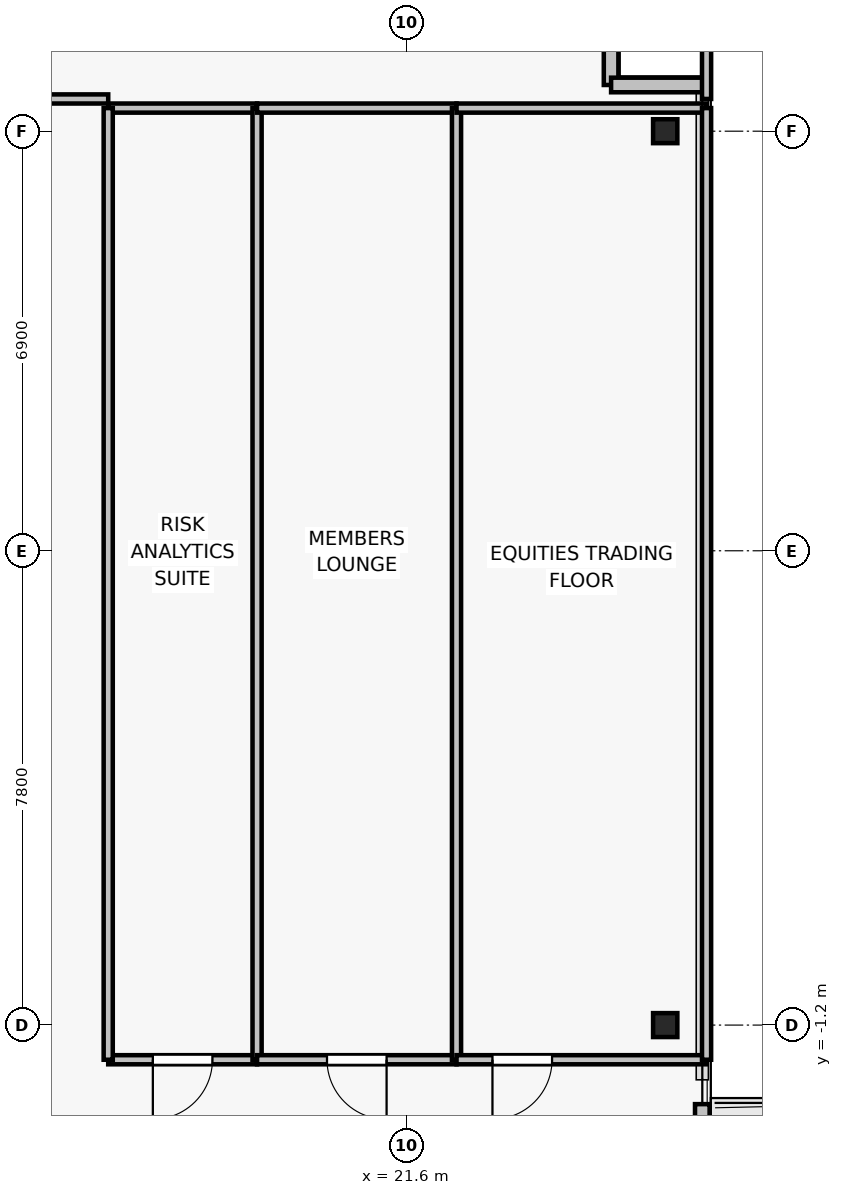
"""IFC4 building model, lengths in metres.
Left out: names, types, materials, properties, quantities, classifications, styles, units other than length and angle.
Written with IfcOpenShell. Run it as: python <this file> out.ifc"""

import sys

from ifc_helpers import new_model, si_unit, direction, frame, frame_2d, origin, origin_2d, place, context, subcontext, project, spatial, rectangle, i_section, extrude, source, transform, mapped, element, fill, save


model = new_model("IFC4")
c1 = context("Model", 3, precision=1e-05, world=origin(), true_north=direction((0.0, 1.0)))
c2 = subcontext(c1, "Body", "Model", "MODEL_VIEW")
j1 = project(units=[si_unit("LENGTHUNIT", "METRE"), si_unit("PLANEANGLEUNIT", "RADIAN")], contexts=[c1])
p1 = place(None, origin())
s1 = spatial("IfcSite", under=j1, at=p1, CompositionType="ELEMENT")
p2 = place(p1, origin())
s2 = spatial("IfcBuilding", under=s1, at=p2, CompositionType="ELEMENT")
p3 = place(p2, frame((0.0, 0.0, 182.5)))
s3 = spatial("IfcBuildingStorey", under=s2, at=p3, CompositionType="ELEMENT", Elevation=182.5)
for number, where, z_axis, x_axis in (
    (1, (25.85, -1.2, 0.0), (0.0, 0.0, 1.0), (1.0, 0.0, 0.0)),
    (2, (25.85, 13.5, 0.0), (0.0, 0.0, 1.0), (1.0, 0.0, 0.0)),
):
    element("IfcColumn", number, at=place(p3, frame(where, z_axis=z_axis, x_axis=x_axis)), inside=s3, PredefinedType="COLUMN", context=c2, shape_type="SweptSolid", body=[
        extrude(i_section(OverallWidth=0.399, OverallDepth=0.394, WebThickness=0.023, FlangeThickness=0.037, FilletRadius=0.015, at=origin_2d()), origin(), (0.0, 0.0, 1.0), 3.3),
    ])
p4 = place(p3, frame((26.46, -2.5, 0.0), z_axis=(0.0, 0.0, 1.0), x_axis=(0.0, -1.0, 0.0)))
e3 = element("IfcWall", 3, at=p4, inside=s3, PredefinedType="SOLIDWALL", context=c2, shape_type="SweptSolid", body=[
    extrude(rectangle(XDim=5.8, YDim=0.24, at=frame_2d((2.9, 0.0))), origin(), (0.0, 0.0, 1.0), 3.075),
])
p5 = place(p4, frame((1.566, 0.0, 0.0)))
e4 = element("IfcOpeningElement", 4, at=p5, cuts=e3, PredefinedType="OPENING", context=c2, shape_type="SweptSolid", body=[
    extrude(rectangle(XDim=1.0, YDim=2.2, at=frame_2d((0.5, 1.1))), frame((0.0, 0.13, 0.0), z_axis=(0.0, -1.0, 0.0), x_axis=(1.0, 0.0, 0.0)), (0.0, 0.0, 1.0), 0.26),
])
p6 = place(p4, frame((2.85, 0.0, 0.85)))
e5 = element("IfcOpeningElement", 5, at=p6, cuts=e3, PredefinedType="OPENING", context=c2, shape_type="SweptSolid", body=[
    extrude(rectangle(XDim=1.5, YDim=1.6, at=frame_2d((0.75, 0.8))), frame((0.0, 0.13, 0.0), z_axis=(0.0, -1.0, 0.0), x_axis=(1.0, 0.0, 0.0)), (0.0, 0.0, 1.0), 0.26),
])
for number, where, z_axis, x_axis in (
    (6, (24.96, 14.26, 0.0), (0.0, 0.0, 1.0), (0.0, 1.0, 0.0)),
    (7, (26.46, 14.26, 0.0), (0.0, 0.0, 1.0), (-1.0, 0.0, 0.0)),
):
    element("IfcWall", number, at=place(p3, frame(where, z_axis=z_axis, x_axis=x_axis)), inside=s3, PredefinedType="SOLIDWALL", context=c2, shape_type="SweptSolid", body=[
        extrude(rectangle(XDim=1.5, YDim=0.24, at=frame_2d((0.75, 0.0))), origin(), (0.0, 0.0, 1.0), 3.075),
    ])
p7 = place(p3, frame((19.138, -1.77, 0.0), z_axis=(0.0, 0.0, 1.0), x_axis=(-1.0, 0.0, 0.0)))
e8 = element("IfcWall", 8, at=p7, inside=s3, PredefinedType="PARTITIONING", context=c2, shape_type="SweptSolid", body=[
    extrude(rectangle(XDim=2.448, YDim=0.15, at=frame_2d((1.224, 0.0))), origin(), (0.0, 0.0, 1.0), 3.075),
])
p8 = place(p7, frame((0.734, 0.0, 0.0)))
e9 = element("IfcOpeningElement", 9, at=p8, cuts=e8, PredefinedType="OPENING", context=c2, shape_type="SweptSolid", body=[
    extrude(rectangle(XDim=0.98, YDim=2.15, at=frame_2d((0.49, 1.075))), frame((0.0, 0.085, 0.0), z_axis=(0.0, -1.0, 0.0), x_axis=(1.0, 0.0, 0.0)), (0.0, 0.0, 1.0), 0.17),
])
p9 = place(p3, frame((16.69, 13.88, 0.0), z_axis=(0.0, 0.0, 1.0), x_axis=(1.0, 0.0, 0.0)))
e10 = element("IfcWall", 10, at=p9, inside=s3, PredefinedType="PARTITIONING", context=c2, shape_type="SweptSolid", body=[
    extrude(rectangle(XDim=2.448, YDim=0.15, at=frame_2d((1.224, 0.0))), origin(), (0.0, 0.0, 1.0), 3.075),
])
for number, where, z_axis, x_axis in (
    (11, (16.69, -1.77, 0.0), (0.0, 0.0, 1.0), (0.0, 1.0, 0.0)),
    (12, (19.138, 13.88, 0.0), (0.0, 0.0, 1.0), (0.0, -1.0, 0.0)),
):
    element("IfcWall", number, at=place(p3, frame(where, z_axis=z_axis, x_axis=x_axis)), inside=s3, PredefinedType="PARTITIONING", context=c2, shape_type="SweptSolid", body=[
        extrude(rectangle(XDim=15.65, YDim=0.15, at=frame_2d((7.825, 0.0))), origin(), (0.0, 0.0, 1.0), 2.565),
    ])
p10 = place(p3, frame((22.418, -1.77, 0.0), z_axis=(0.0, 0.0, 1.0), x_axis=(-1.0, 0.0, 0.0)))
e13 = element("IfcWall", 13, at=p10, inside=s3, PredefinedType="PARTITIONING", context=c2, shape_type="SweptSolid", body=[
    extrude(rectangle(XDim=3.28, YDim=0.15, at=frame_2d((1.64, 0.0))), origin(), (0.0, 0.0, 1.0), 3.075),
])
p11 = place(p10, frame((1.15, 0.0, 0.0)))
e14 = element("IfcOpeningElement", 14, at=p11, cuts=e13, PredefinedType="OPENING", context=c2, shape_type="SweptSolid", body=[
    extrude(rectangle(XDim=0.98, YDim=2.15, at=frame_2d((0.49, 1.075))), frame((0.0, 0.085, 0.0), z_axis=(0.0, -1.0, 0.0), x_axis=(1.0, 0.0, 0.0)), (0.0, 0.0, 1.0), 0.17),
])
p12 = place(p3, frame((19.138, 13.88, 0.0), z_axis=(0.0, 0.0, 1.0), x_axis=(1.0, 0.0, 0.0)))
e15 = element("IfcWall", 15, at=p12, inside=s3, PredefinedType="PARTITIONING", context=c2, shape_type="SweptSolid", body=[
    extrude(rectangle(XDim=3.28, YDim=0.15, at=frame_2d((1.64, 0.0))), origin(), (0.0, 0.0, 1.0), 3.075),
])
p13 = place(p3, frame((22.418, 13.88, 0.0), z_axis=(0.0, 0.0, 1.0), x_axis=(0.0, -1.0, 0.0)))
e16 = element("IfcWall", 16, at=p13, inside=s3, PredefinedType="PARTITIONING", context=c2, shape_type="SweptSolid", body=[
    extrude(rectangle(XDim=15.65, YDim=0.15, at=frame_2d((7.825, 0.0))), origin(), (0.0, 0.0, 1.0), 2.565),
])
p14 = place(p3, frame((26.53, -1.77, 0.0), z_axis=(0.0, 0.0, 1.0), x_axis=(-1.0, 0.0, 0.0)))
e17 = element("IfcWall", 17, at=p14, inside=s3, PredefinedType="PARTITIONING", context=c2, shape_type="SweptSolid", body=[
    extrude(rectangle(XDim=4.112, YDim=0.15, at=frame_2d((2.056, 0.0))), origin(), (0.0, 0.0, 1.0), 2.565),
])
p15 = place(p14, frame((2.541, 0.0, 0.0)))
e18 = element("IfcOpeningElement", 18, at=p15, cuts=e17, PredefinedType="OPENING", context=c2, shape_type="SweptSolid", body=[
    extrude(rectangle(XDim=0.98, YDim=2.15, at=frame_2d((0.49, 1.075))), frame((0.0, 0.085, 0.0), z_axis=(0.0, -1.0, 0.0), x_axis=(1.0, 0.0, 0.0)), (0.0, 0.0, 1.0), 0.17),
])
p16 = place(p3, frame((22.418, 13.88, 0.0), z_axis=(0.0, 0.0, 1.0), x_axis=(1.0, 0.0, 0.0)))
e19 = element("IfcWall", 19, at=p16, inside=s3, PredefinedType="PARTITIONING", context=c2, shape_type="SweptSolid", body=[
    extrude(rectangle(XDim=4.112, YDim=0.15, at=frame_2d((2.056, 0.0))), origin(), (0.0, 0.0, 1.0), 3.075),
])
p17 = place(p3, frame((26.53, 13.88, 0.0), z_axis=(0.0, 0.0, 1.0), x_axis=(0.0, -1.0, 0.0)))
e20 = element("IfcWall", 20, at=p17, inside=s3, PredefinedType="PARTITIONING", context=c2, shape_type="SweptSolid", body=[
    extrude(rectangle(XDim=15.65, YDim=0.15, at=frame_2d((7.825, 0.0))), origin(), (0.0, 0.0, 1.0), 3.075),
])
p18 = place(p3, frame((16.69, 14.03, 0.0), z_axis=(0.0, 0.0, 1.0), x_axis=(-1.0, 0.0, 0.0)))
e21 = element("IfcWall", 21, at=p18, inside=s3, PredefinedType="PARTITIONING", context=c2, shape_type="SweptSolid", body=[
    extrude(rectangle(XDim=2.79, YDim=0.15, at=frame_2d((1.395, 0.0))), origin(), (0.0, 0.0, 1.0), 2.565),
])
p19 = place(p3, frame((26.53, 17.33, 0.0), z_axis=(0.0, 0.0, 1.0), x_axis=(0.0, -1.0, 0.0)))
e22 = element("IfcWall", 22, at=p19, inside=s3, PredefinedType="PARTITIONING", context=c2, shape_type="SweptSolid", body=[
    extrude(rectangle(XDim=3.3, YDim=0.15, at=frame_2d((1.65, 0.0))), origin(), (0.0, 0.0, 1.0), 3.075),
])
m1 = source(origin(), c2, "Body", "SweptSolid", [
    extrude(rectangle(XDim=0.98, YDim=2.15, at=frame_2d((0.49, 1.075))), frame((0.0, 0.025, 0.0), z_axis=(0.0, -1.0, 0.0), x_axis=(1.0, 0.0, 0.0)), (0.0, 0.0, 1.0), 0.05),
])
p20 = place(p8, origin())
e23 = element("IfcDoor", 23, at=p20, inside=s3, OperationType="SINGLE_SWING_RIGHT", PredefinedType="DOOR", context=c2, shape_type="MappedRepresentation", body=[
    mapped(m1, transform((0.0, 0.0, 0.0), x_axis=(1.0, 0.0, 0.0), y_axis=(0.0, 1.0, 0.0), z_axis=(0.0, 0.0, 1.0), scale=1.0)),
])
fill(e9, e23)
p21 = place(p11, origin())
e24 = element("IfcDoor", 24, at=p21, inside=s3, OperationType="SINGLE_SWING_LEFT", PredefinedType="DOOR", context=c2, shape_type="MappedRepresentation", body=[
    mapped(m1, transform((0.0, 0.0, 0.0), x_axis=(1.0, 0.0, 0.0), y_axis=(0.0, 1.0, 0.0), z_axis=(0.0, 0.0, 1.0), scale=1.0)),
])
fill(e14, e24)
p22 = place(p15, origin())
e25 = element("IfcDoor", 25, at=p22, inside=s3, OperationType="SINGLE_SWING_RIGHT", PredefinedType="DOOR", context=c2, shape_type="MappedRepresentation", body=[
    mapped(m1, transform((0.0, 0.0, 0.0), x_axis=(1.0, 0.0, 0.0), y_axis=(0.0, 1.0, 0.0), z_axis=(0.0, 0.0, 1.0), scale=1.0)),
])
fill(e18, e25)
save(model, sys.argv[1])
